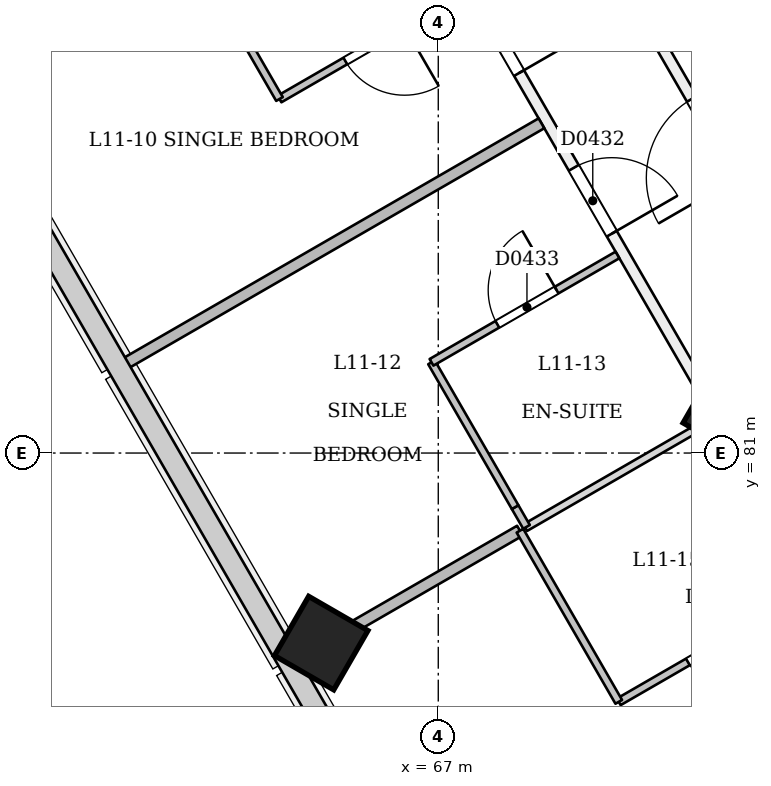
"""IFC4 building model, lengths in metres.
Left out: names, types, materials, properties, quantities, classifications, styles, units other than length and angle.
Written with IfcOpenShell. Run it as: python <this file> out.ifc"""

import sys

from ifc_helpers import new_model, si_unit, direction, frame, frame_2d, origin, origin_2d, place, context, subcontext, project, spatial, rectangle, extrude, element, fill, save


model = new_model("IFC4")
c1 = context("Model", 3, precision=1e-05, world=origin(), true_north=direction((0.0, 1.0)))
c2 = subcontext(c1, "Body", "Model", "MODEL_VIEW")
j1 = project(units=[si_unit("LENGTHUNIT", "METRE"), si_unit("PLANEANGLEUNIT", "RADIAN")], contexts=[c1])
p1 = place(None, origin())
s1 = spatial("IfcSite", under=j1, at=p1, CompositionType="ELEMENT")
p2 = place(p1, origin())
s2 = spatial("IfcBuilding", under=s1, at=p2, CompositionType="ELEMENT")
p3 = place(p2, frame((0.0, 0.0, 48.6)))
s3 = spatial("IfcBuildingStorey", under=s2, at=p3, CompositionType="ELEMENT", Elevation=48.6)
p4 = place(p3, frame((70.672, 81.478, -0.021), z_axis=(0.022222852987, 0.038483477124, 0.999012095419), x_axis=(-0.865643577248, -0.499179409403, 0.038485249093)))
e1 = element("IfcColumn", 1, at=p4, inside=s3, PredefinedType="COLUMN", context=c2, shape_type="SweptSolid", body=[
    extrude(rectangle(XDim=0.7, YDim=0.7, at=origin_2d()), origin(), (0.0, 0.0, 1.0), 3.604),
])
p5 = place(p3, frame((65.433, 78.452, -0.027), z_axis=(0.02215519141, 0.038415882353, 0.999016199807), x_axis=(-0.865366150821, -0.499666349732, 0.03840525952)))
e2 = element("IfcColumn", 2, at=p5, inside=s3, PredefinedType="COLUMN", context=c2, shape_type="SweptSolid", body=[
    extrude(rectangle(XDim=0.9, YDim=0.9, at=origin_2d()), origin(), (0.0, 0.0, 1.0), 3.604),
])
p6 = place(p3, frame((63.923, 93.17, 0.0), z_axis=(0.0, 0.0, 1.0), x_axis=(0.500002225217, -0.866024119051, 0.0)))
e3 = element("IfcWall", 3, at=p6, inside=s3, PredefinedType="PARTITIONING", context=c2, shape_type="SweptSolid", body=[
    extrude(rectangle(XDim=38.6, YDim=0.15, at=frame_2d((19.3, 0.0))), origin(), (0.0, 0.0, 1.0), 2.7),
])
p7 = place(p6, frame((0.605, 0.0, 0.0)))
e4 = element("IfcOpeningElement", 4, at=p7, cuts=e3, PredefinedType="OPENING", context=c2, shape_type="SweptSolid", body=[
    extrude(rectangle(XDim=1.0, YDim=2.1, at=frame_2d((0.5, 1.05))), frame((0.0, 0.085, 0.0), z_axis=(0.0, -1.0, 0.0), x_axis=(1.0, 0.0, 0.0)), (0.0, 0.0, 1.0), 0.171),
])
p8 = place(p6, frame((7.28, 0.0, 0.0)))
e5 = element("IfcOpeningElement", 5, at=p8, cuts=e3, PredefinedType="OPENING", context=c2, shape_type="SweptSolid", body=[
    extrude(rectangle(XDim=1.0, YDim=2.1, at=frame_2d((0.5, 1.05))), frame((0.0, 0.085, 0.0), z_axis=(0.0, -1.0, 0.0), x_axis=(1.0, 0.0, 0.0)), (0.0, 0.0, 1.0), 0.171),
])
p9 = place(p6, frame((9.72, 0.0, 0.0)))
e6 = element("IfcOpeningElement", 6, at=p9, cuts=e3, PredefinedType="OPENING", context=c2, shape_type="SweptSolid", body=[
    extrude(rectangle(XDim=1.0, YDim=2.1, at=frame_2d((0.5, 1.05))), frame((0.0, 0.085, 0.0), z_axis=(0.0, -1.0, 0.0), x_axis=(1.0, 0.0, 0.0)), (0.0, 0.0, 1.0), 0.171),
])
p10 = place(p6, frame((16.395, 0.0, 0.0)))
e7 = element("IfcOpeningElement", 7, at=p10, cuts=e3, PredefinedType="OPENING", context=c2, shape_type="SweptSolid", body=[
    extrude(rectangle(XDim=1.0, YDim=2.1, at=frame_2d((0.5, 1.05))), frame((0.0, 0.085, 0.0), z_axis=(0.0, -1.0, 0.0), x_axis=(1.0, 0.0, 0.0)), (0.0, 0.0, 1.0), 0.171),
])
p11 = place(p6, frame((18.72, 0.0, 0.0)))
e8 = element("IfcOpeningElement", 8, at=p11, cuts=e3, PredefinedType="OPENING", context=c2, shape_type="SweptSolid", body=[
    extrude(rectangle(XDim=1.0, YDim=2.1, at=frame_2d((0.5, 1.05))), frame((0.0, 0.085, 0.0), z_axis=(0.0, -1.0, 0.0), x_axis=(1.0, 0.0, 0.0)), (0.0, 0.0, 1.0), 0.171),
])
p12 = place(p6, frame((25.395, 0.0, 0.0)))
e9 = element("IfcOpeningElement", 9, at=p12, cuts=e3, PredefinedType="OPENING", context=c2, shape_type="SweptSolid", body=[
    extrude(rectangle(XDim=1.0, YDim=2.1, at=frame_2d((0.5, 1.05))), frame((0.0, 0.085, 0.0), z_axis=(0.0, -1.0, 0.0), x_axis=(1.0, 0.0, 0.0)), (0.0, 0.0, 1.0), 0.171),
])
p13 = place(p6, frame((27.605, 0.0, 0.0)))
e10 = element("IfcOpeningElement", 10, at=p13, cuts=e3, PredefinedType="OPENING", context=c2, shape_type="SweptSolid", body=[
    extrude(rectangle(XDim=1.0, YDim=2.1, at=frame_2d((0.5, 1.05))), frame((0.0, 0.085, 0.0), z_axis=(0.0, -1.0, 0.0), x_axis=(1.0, 0.0, 0.0)), (0.0, 0.0, 1.0), 0.171),
])
p14 = place(p6, frame((34.28, 0.0, 0.0)))
e11 = element("IfcOpeningElement", 11, at=p14, cuts=e3, PredefinedType="OPENING", context=c2, shape_type="SweptSolid", body=[
    extrude(rectangle(XDim=1.0, YDim=2.1, at=frame_2d((0.5, 1.05))), frame((0.0, 0.085, 0.0), z_axis=(0.0, -1.0, 0.0), x_axis=(1.0, 0.0, 0.0)), (0.0, 0.0, 1.0), 0.171),
])
p15 = place(p6, frame((37.342, 0.0, 0.0)))
e12 = element("IfcOpeningElement", 12, at=p15, cuts=e3, PredefinedType="OPENING", context=c2, shape_type="SweptSolid", body=[
    extrude(rectangle(XDim=1.0, YDim=2.1, at=frame_2d((0.5, 1.05))), frame((0.0, 0.085, 0.0), z_axis=(0.0, -1.0, 0.0), x_axis=(1.0, 0.0, 0.0)), (0.0, 0.0, 1.0), 0.171),
])
p16 = place(p3, frame((85.0, 60.262, 0.0), z_axis=(0.0, 0.0, 1.0), x_axis=(-0.499998554739, 0.866026238205, 0.0)))
e13 = element("IfcWall", 13, at=p16, inside=s3, PredefinedType="PARTITIONING", context=c2, shape_type="SweptSolid", body=[
    extrude(rectangle(XDim=35.031, YDim=0.15, at=frame_2d((17.515, 0.0))), origin(), (0.0, 0.0, 1.0), 3.1),
])
p17 = place(p16, frame((6.026, 0.0, 0.0)))
e14 = element("IfcOpeningElement", 14, at=p17, cuts=e13, PredefinedType="OPENING", context=c2, shape_type="SweptSolid", body=[
    extrude(rectangle(XDim=1.2, YDim=2.1, at=frame_2d((0.6, 1.05))), frame((0.0, 0.085, 0.0), z_axis=(0.0, -1.0, 0.0), x_axis=(1.0, 0.0, 0.0)), (0.0, 0.0, 1.0), 0.171),
])
p18 = place(p16, frame((19.295, 0.0, 0.0)))
e15 = element("IfcOpeningElement", 15, at=p18, cuts=e13, PredefinedType="OPENING", context=c2, shape_type="SweptSolid", body=[
    extrude(rectangle(XDim=1.2, YDim=2.1, at=frame_2d((0.6, 1.05))), frame((0.0, 0.085, 0.0), z_axis=(0.0, -1.0, 0.0), x_axis=(1.0, 0.0, 0.0)), (0.0, 0.0, 1.0), 0.171),
])
p19 = place(p16, frame((28.126, 0.0, 0.0)))
e16 = element("IfcOpeningElement", 16, at=p19, cuts=e13, PredefinedType="OPENING", context=c2, shape_type="SweptSolid", body=[
    extrude(rectangle(XDim=1.2, YDim=2.1, at=frame_2d((0.6, 1.05))), frame((0.0, 0.085, 0.0), z_axis=(0.0, -1.0, 0.0), x_axis=(1.0, 0.0, 0.0)), (0.0, 0.0, 1.0), 0.171),
])
p20 = place(p16, frame((11.927, 0.0, 0.0)))
e17 = element("IfcOpeningElement", 17, at=p20, cuts=e13, PredefinedType="OPENING", context=c2, shape_type="SweptSolid", body=[
    extrude(rectangle(XDim=1.2, YDim=2.1, at=frame_2d((0.6, 1.05))), frame((0.0, 0.085, 0.0), z_axis=(0.0, -1.0, 0.0), x_axis=(1.0, 0.0, 0.0)), (0.0, 0.0, 1.0), 0.171),
])
p21 = place(p16, frame((16.039, 0.0, 0.0)))
e18 = element("IfcOpeningElement", 18, at=p21, cuts=e13, PredefinedType="OPENING", context=c2, shape_type="SweptSolid", body=[
    extrude(rectangle(XDim=1.2, YDim=2.1, at=frame_2d((0.6, 1.05))), frame((0.0, 0.085, 0.0), z_axis=(0.0, -1.0, 0.0), x_axis=(1.0, 0.0, 0.0)), (0.0, 0.0, 1.0), 0.171),
])
p22 = place(p16, frame((23.133, 0.0, 0.0)))
e19 = element("IfcOpeningElement", 19, at=p22, cuts=e13, PredefinedType="OPENING", context=c2, shape_type="SweptSolid", body=[
    extrude(rectangle(XDim=1.0, YDim=2.1, at=frame_2d((0.5, 1.05))), frame((0.0, 0.085, 0.0), z_axis=(0.0, -1.0, 0.0), x_axis=(1.0, 0.0, 0.0)), (0.0, 0.0, 1.0), 0.171),
])
p23 = place(p3, frame((60.63, 86.073, 0.0), z_axis=(0.0, 0.0, 1.0), x_axis=(0.865989424415, 0.500062312919, 0.0)))
e20 = element("IfcWall", 20, at=p23, inside=s3, PredefinedType="PARTITIONING", context=c2, shape_type="SweptSolid", body=[
    extrude(rectangle(XDim=3.42, YDim=0.15, at=frame_2d((1.71, 0.0))), origin(), (0.0, 0.0, 1.0), 2.6),
])
p24 = place(p3, frame((67.358, 87.07, 0.0), z_axis=(0.0, 0.0, 1.0), x_axis=(-0.866011447264, -0.500024172624, 0.0)))
e21 = element("IfcWall", 21, at=p24, inside=s3, PredefinedType="PARTITIONING", context=c2, shape_type="SweptSolid", body=[
    extrude(rectangle(XDim=2.825, YDim=0.1, at=frame_2d((1.413, 0.0))), origin(), (0.0, 0.0, 1.0), 3.1),
])
p25 = place(p24, frame((0.925, 0.0, 0.0)))
e22 = element("IfcOpeningElement", 22, at=p25, cuts=e21, PredefinedType="OPENING", context=c2, shape_type="SweptSolid", body=[
    extrude(rectangle(XDim=0.9, YDim=2.1, at=frame_2d((0.45, 1.05))), frame((0.0, 0.061, 0.0), z_axis=(0.0, -1.0, 0.0), x_axis=(1.0, 0.0, 0.0)), (0.0, 0.0, 1.0), 0.121),
])
p26 = place(p3, frame((64.911, 85.657, 0.0), z_axis=(0.0, 0.0, 1.0), x_axis=(-0.500004234368, 0.866022959057, 0.0)))
e23 = element("IfcWall", 23, at=p26, inside=s3, PredefinedType="PARTITIONING", context=c2, shape_type="SweptSolid", body=[
    extrude(rectangle(XDim=2.5, YDim=0.1, at=frame_2d((1.25, 0.0))), origin(), (0.0, 0.0, 1.0), 2.7),
])
p27 = place(p3, frame((62.863, 82.165, 0.0), z_axis=(0.0, 0.0, 1.0), x_axis=(0.866025401434, 0.500000004071, 0.0)))
e24 = element("IfcWall", 24, at=p27, inside=s3, PredefinedType="PARTITIONING", context=c2, shape_type="SweptSolid", body=[
    extrude(rectangle(XDim=6.345, YDim=0.15, at=frame_2d((3.173, 0.0))), origin(), (0.0, 0.0, 1.0), 2.6),
])
p28 = place(p3, frame((68.161, 80.028, 0.0), z_axis=(0.0, 0.0, 1.0), x_axis=(-0.500426713919, 0.865778900179, 0.0)))
e25 = element("IfcWall", 25, at=p28, inside=s3, PredefinedType="PARTITIONING", context=c2, shape_type="SweptSolid", body=[
    extrude(rectangle(XDim=0.3, YDim=0.1, at=frame_2d((0.15, 0.0))), origin(), (0.0, 0.0, 1.0), 2.7),
])
p29 = place(p3, frame((68.011, 80.288, 0.0), z_axis=(0.0, 0.0, 1.0), x_axis=(-0.499946605688, 0.86605622881, 0.0)))
e26 = element("IfcWall", 26, at=p29, inside=s3, PredefinedType="PARTITIONING", context=c2, shape_type="SweptSolid", body=[
    extrude(rectangle(XDim=2.2, YDim=0.1, at=frame_2d((1.1, 0.0))), origin(), (0.0, 0.0, 1.0), 3.1),
])
p30 = place(p3, frame((66.911, 82.193, 0.0), z_axis=(0.0, 0.0, 1.0), x_axis=(0.866011447264, 0.500024172624, 0.0)))
e27 = element("IfcWall", 27, at=p30, inside=s3, PredefinedType="PARTITIONING", context=c2, shape_type="SweptSolid", body=[
    extrude(rectangle(XDim=2.825, YDim=0.1, at=frame_2d((1.413, 0.0))), origin(), (0.0, 0.0, 1.0), 3.1),
])
p31 = place(p30, frame((1.0, 0.0, 0.0)))
e28 = element("IfcOpeningElement", 28, at=p31, cuts=e27, PredefinedType="OPENING", context=c2, shape_type="SweptSolid", body=[
    extrude(rectangle(XDim=0.9, YDim=2.1, at=frame_2d((0.45, 1.05))), frame((0.0, 0.061, 0.0), z_axis=(0.0, -1.0, 0.0), x_axis=(1.0, 0.0, 0.0)), (0.0, 0.0, 1.0), 0.121),
])
p32 = place(p3, frame((65.13, 78.278, 0.0), z_axis=(0.0, 0.0, 1.0), x_axis=(0.866020560687, 0.500008388397, 0.0)))
e29 = element("IfcWall", 29, at=p32, inside=s3, PredefinedType="PARTITIONING", context=c2, shape_type="SweptSolid", body=[
    extrude(rectangle(XDim=3.4, YDim=0.15, at=frame_2d((1.7, 0.0))), origin(), (0.0, 0.0, 1.0), 2.6),
])
p33 = place(p3, frame((68.144, 80.018, 0.0), z_axis=(0.0, 0.0, 1.0), x_axis=(0.866011243319, 0.500024525844, 0.0)))
e30 = element("IfcWall", 30, at=p33, inside=s3, PredefinedType="PARTITIONING", context=c2, shape_type="SweptSolid", body=[
    extrude(rectangle(XDim=2.845, YDim=0.1, at=frame_2d((1.422, 0.0))), origin(), (0.0, 0.0, 1.0), 2.7),
])
p34 = place(p3, frame((71.908, 79.189, 0.0), z_axis=(0.0, 0.0, 1.0), x_axis=(-0.866046596414, -0.499963291492, 0.0)))
e31 = element("IfcWall", 31, at=p34, inside=s3, PredefinedType="PARTITIONING", context=c2, shape_type="SweptSolid", body=[
    extrude(rectangle(XDim=2.925, YDim=0.1, at=frame_2d((1.462, 0.0))), origin(), (0.0, 0.0, 1.0), 3.1),
])
p35 = place(p34, frame((0.975, 0.0, 0.0)))
e32 = element("IfcOpeningElement", 32, at=p35, cuts=e31, PredefinedType="OPENING", context=c2, shape_type="SweptSolid", body=[
    extrude(rectangle(XDim=0.9, YDim=2.1, at=frame_2d((0.45, 1.05))), frame((0.0, 0.061, 0.0), z_axis=(0.0, -1.0, 0.0), x_axis=(1.0, 0.0, 0.0)), (0.0, 0.0, 1.0), 0.121),
])
p36 = place(p3, frame((69.375, 77.727, 0.0), z_axis=(0.0, 0.0, 1.0), x_axis=(-0.500047596559, 0.865997922154, 0.0)))
e33 = element("IfcWall", 33, at=p36, inside=s3, PredefinedType="PARTITIONING", context=c2, shape_type="SweptSolid", body=[
    extrude(rectangle(XDim=2.6, YDim=0.1, at=frame_2d((1.3, 0.0))), origin(), (0.0, 0.0, 1.0), 2.7),
])
p37 = place(p8, origin())
e34 = element("IfcDoor", 34, at=p37, inside=s3, OperationType="SINGLE_SWING_RIGHT", PredefinedType="NOTDEFINED", context=c2, shape_type="SweptSolid", body=[
    extrude(rectangle(XDim=1.0, YDim=2.1, at=frame_2d((0.5, 1.05))), frame((0.0, 0.025, 0.0), z_axis=(0.0, -1.0, 0.0), x_axis=(1.0, 0.0, 0.0)), (0.0, 0.0, 1.0), 0.05),
])
fill(e5, e34)
p38 = place(p25, origin())
e35 = element("IfcDoor", 35, at=p38, inside=s3, OperationType="SINGLE_SWING_LEFT", PredefinedType="NOTDEFINED", context=c2, shape_type="SweptSolid", body=[
    extrude(rectangle(XDim=0.9, YDim=2.1, at=frame_2d((0.45, 1.05))), frame((0.0, 0.025, 0.0), z_axis=(0.0, -1.0, 0.0), x_axis=(1.0, 0.0, 0.0)), (0.0, 0.0, 1.0), 0.05),
])
fill(e22, e35)
p39 = place(p9, origin())
e36 = element("IfcDoor", 36, at=p39, inside=s3, OperationType="SINGLE_SWING_RIGHT", PredefinedType="NOTDEFINED", context=c2, shape_type="SweptSolid", body=[
    extrude(rectangle(XDim=1.0, YDim=2.1, at=frame_2d((0.5, 1.05))), frame((0.0, 0.025, 0.0), z_axis=(0.0, -1.0, 0.0), x_axis=(1.0, 0.0, 0.0)), (0.0, 0.0, 1.0), 0.05),
])
fill(e6, e36)
p40 = place(p31, origin())
e37 = element("IfcDoor", 37, at=p40, inside=s3, OperationType="SINGLE_SWING_RIGHT", PredefinedType="NOTDEFINED", context=c2, shape_type="SweptSolid", body=[
    extrude(rectangle(XDim=0.9, YDim=2.1, at=frame_2d((0.45, 1.05))), frame((0.0, 0.025, 0.0), z_axis=(0.0, -1.0, 0.0), x_axis=(1.0, 0.0, 0.0)), (0.0, 0.0, 1.0), 0.05),
])
fill(e28, e37)
p41 = place(p35, origin())
e38 = element("IfcDoor", 38, at=p41, inside=s3, OperationType="SINGLE_SWING_LEFT", PredefinedType="NOTDEFINED", context=c2, shape_type="SweptSolid", body=[
    extrude(rectangle(XDim=0.9, YDim=2.1, at=frame_2d((0.45, 1.05))), frame((0.0, 0.025, 0.0), z_axis=(0.0, -1.0, 0.0), x_axis=(1.0, 0.0, 0.0)), (0.0, 0.0, 1.0), 0.05),
])
fill(e32, e38)
p42 = place(p19, origin())
e39 = element("IfcDoor", 39, at=p42, inside=s3, OperationType="SINGLE_SWING_LEFT", PredefinedType="NOTDEFINED", context=c2, shape_type="SweptSolid", body=[
    extrude(rectangle(XDim=1.2, YDim=2.1, at=frame_2d((0.6, 1.05))), frame((0.0, 0.025, 0.0), z_axis=(0.0, -1.0, 0.0), x_axis=(1.0, 0.0, 0.0)), (0.0, 0.0, 1.0), 0.05),
])
fill(e16, e39)
save(model, sys.argv[1])
